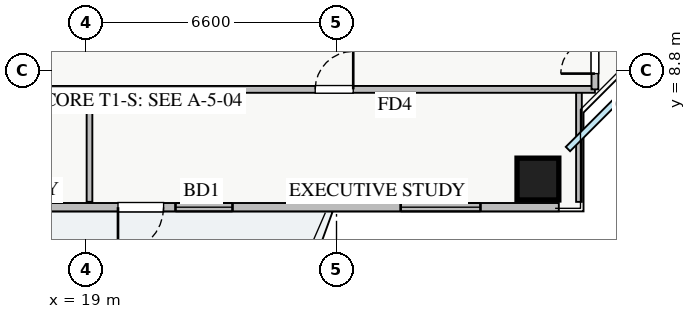
"""IFC4 building model, lengths in metres.
Left out: names, types, materials, properties, quantities, classifications, styles, units other than length and angle.
Written with IfcOpenShell. Run it as: python <this file> out.ifc"""

import sys

from ifc_helpers import new_model, si_unit, direction, frame, frame_2d, origin, origin_2d, place, context, subcontext, project, spatial, rectangle, extrude, source, transform, mapped, element, fill, save


model = new_model("IFC4")
c1 = context("Model", 3, precision=1e-05, world=origin(), true_north=direction((0.0, 1.0)))
c2 = subcontext(c1, "Body", "Model", "MODEL_VIEW")
j1 = project(units=[si_unit("LENGTHUNIT", "METRE"), si_unit("PLANEANGLEUNIT", "RADIAN")], contexts=[c1])
p1 = place(None, origin())
s1 = spatial("IfcSite", under=j1, at=p1, CompositionType="ELEMENT")
p2 = place(p1, origin())
s2 = spatial("IfcBuilding", under=s1, at=p2, CompositionType="ELEMENT")
p3 = place(p2, frame((0.0, 0.0, 103.5)))
s3 = spatial("IfcBuildingStorey", under=s2, at=p3, CompositionType="ELEMENT", Elevation=103.5)
m1 = source(origin(), c2, "Body", "SweptSolid", [
    extrude(rectangle(XDim=1.1, YDim=1.1, at=origin_2d()), origin(), (0.0, 0.0, 1.0), 3.25),
])
p4 = place(p3, frame((30.9, 5.95, 0.0), z_axis=(0.0, 0.0, 1.0), x_axis=(1.0, 0.0, 0.0)))
e1 = element("IfcColumn", 1, at=p4, inside=s3, PredefinedType="COLUMN", context=c2, shape_type="MappedRepresentation", body=[
    mapped(m1, transform((0.0, 0.0, 0.0), x_axis=(1.0, 0.0, 0.0), y_axis=(0.0, 1.0, 0.0), z_axis=(0.0, 0.0, 1.0), scale=1.0)),
])
p5 = place(p3, frame((6.55, 5.21, 0.0), z_axis=(0.0, 0.0, 1.0), x_axis=(1.0, 0.0, 0.0)))
e2 = element("IfcWall", 2, at=p5, inside=s3, PredefinedType="STANDARD", context=c2, shape_type="SweptSolid", body=[
    extrude(rectangle(XDim=24.9, YDim=0.22, at=frame_2d((12.45, 0.0))), origin(), (0.0, 0.0, 1.0), 2.61),
])
p6 = place(p5, frame((13.3, 0.0, 0.0)))
e3 = element("IfcOpeningElement", 3, at=p6, cuts=e2, PredefinedType="OPENING", context=c2, shape_type="SweptSolid", body=[
    extrude(rectangle(XDim=1.2, YDim=2.1, at=frame_2d((0.6, 1.05))), frame((0.0, 0.12, 0.0), z_axis=(0.0, -1.0, 0.0), x_axis=(1.0, 0.0, 0.0)), (0.0, 0.0, 1.0), 0.24),
])
p7 = place(p5, frame((0.393, 0.0, 0.9)))
e4 = element("IfcOpeningElement", 4, at=p7, cuts=e2, PredefinedType="OPENING", context=c2, shape_type="SweptSolid", body=[
    extrude(rectangle(XDim=1.5, YDim=1.5, at=frame_2d((0.75, 0.75))), frame((0.0, 0.12, 0.0), z_axis=(0.0, -1.0, 0.0), x_axis=(1.0, 0.0, 0.0)), (0.0, 0.0, 1.0), 0.24),
])
p8 = place(p5, frame((8.438, 0.0, 0.9)))
e5 = element("IfcOpeningElement", 5, at=p8, cuts=e2, PredefinedType="OPENING", context=c2, shape_type="SweptSolid", body=[
    extrude(rectangle(XDim=1.8, YDim=1.45, at=frame_2d((0.9, 0.725))), frame((0.0, 0.12, 0.0), z_axis=(0.0, -1.0, 0.0), x_axis=(1.0, 0.0, 0.0)), (0.0, 0.0, 1.0), 0.24),
])
p9 = place(p5, frame((14.813, 0.0, 0.9)))
e6 = element("IfcOpeningElement", 6, at=p9, cuts=e2, PredefinedType="OPENING", context=c2, shape_type="SweptSolid", body=[
    extrude(rectangle(XDim=1.5, YDim=1.45, at=frame_2d((0.75, 0.725))), frame((0.0, 0.12, 0.0), z_axis=(0.0, -1.0, 0.0), x_axis=(1.0, 0.0, 0.0)), (0.0, 0.0, 1.0), 0.24),
])
p10 = place(p5, frame((20.738, 0.0, 0.9)))
e7 = element("IfcOpeningElement", 7, at=p10, cuts=e2, PredefinedType="OPENING", context=c2, shape_type="SweptSolid", body=[
    extrude(rectangle(XDim=2.1, YDim=1.48, at=frame_2d((1.05, 0.74))), frame((0.0, 0.12, 0.0), z_axis=(0.0, -1.0, 0.0), x_axis=(1.0, 0.0, 0.0)), (0.0, 0.0, 1.0), 0.24),
])
p11 = place(p5, frame((4.171, 0.0, 0.9)))
e8 = element("IfcOpeningElement", 8, at=p11, cuts=e2, PredefinedType="OPENING", context=c2, shape_type="SweptSolid", body=[
    extrude(rectangle(XDim=2.4, YDim=1.5, at=frame_2d((1.2, 0.75))), frame((0.0, 0.12, 0.0), z_axis=(0.0, -1.0, 0.0), x_axis=(1.0, 0.0, 0.0)), (0.0, 0.0, 1.0), 0.24),
])
p12 = place(p3, frame((19.1, 5.35, 0.0), z_axis=(0.0, 0.0, 1.0), x_axis=(0.0, 1.0, 0.0)))
e9 = element("IfcWall", 9, at=p12, inside=s3, PredefinedType="PARTITIONING", context=c2, shape_type="SweptSolid", body=[
    extrude(rectangle(XDim=2.96, YDim=0.15, at=frame_2d((1.48, 0.0))), origin(), (0.0, 0.0, 1.0), 2.865),
])
p13 = place(p3, frame((31.98, 5.35, 0.0), z_axis=(0.0, 0.0, 1.0), x_axis=(0.0, 1.0, 0.0)))
e10 = element("IfcWall", 10, at=p13, inside=s3, PredefinedType="PARTITIONING", context=c2, shape_type="SweptSolid", body=[
    extrude(rectangle(XDim=2.96, YDim=0.15, at=frame_2d((1.48, 0.0))), origin(), (0.0, 0.0, 1.0), 3.07),
])
p14 = place(p3, frame((8.82, 8.31, 0.0), z_axis=(0.0, 0.0, 1.0), x_axis=(1.0, 0.0, 0.0)))
e11 = element("IfcWall", 11, at=p14, inside=s3, PredefinedType="PARTITIONING", context=c2, shape_type="SweptSolid", body=[
    extrude(rectangle(XDim=23.58, YDim=0.18, at=frame_2d((11.79, 0.0))), origin(), (0.0, 0.0, 1.0), 3.07),
])
p15 = place(p14, frame((4.64, 0.0, 0.0)))
e12 = element("IfcOpeningElement", 12, at=p15, cuts=e11, PredefinedType="OPENING", context=c2, shape_type="SweptSolid", body=[
    extrude(rectangle(XDim=1.0, YDim=2.05, at=frame_2d((0.5, 1.025))), frame((0.0, 0.1, 0.0), z_axis=(0.0, -1.0, 0.0), x_axis=(1.0, 0.0, 0.0)), (0.0, 0.0, 1.0), 0.2),
])
p16 = place(p14, frame((16.22, 0.0, 0.0)))
e13 = element("IfcOpeningElement", 13, at=p16, cuts=e11, PredefinedType="OPENING", context=c2, shape_type="SweptSolid", body=[
    extrude(rectangle(XDim=1.0, YDim=2.05, at=frame_2d((0.5, 1.025))), frame((0.0, 0.1, 0.0), z_axis=(0.0, -1.0, 0.0), x_axis=(1.0, 0.0, 0.0)), (0.0, 0.0, 1.0), 0.2),
])
p17 = place(p3, frame((32.4, 8.31, 0.0), z_axis=(0.0, 0.0, 1.0), x_axis=(0.0, 1.0, 0.0)))
e14 = element("IfcWall", 14, at=p17, inside=s3, PredefinedType="PARTITIONING", context=c2, shape_type="SweptSolid", body=[
    extrude(rectangle(XDim=29.13, YDim=0.18, at=frame_2d((14.565, 0.0))), origin(), (0.0, 0.0, 1.0), 3.07),
])
p18 = place(p17, frame((27.94, 0.0, 0.0)))
e15 = element("IfcOpeningElement", 15, at=p18, cuts=e14, PredefinedType="OPENING", context=c2, shape_type="SweptSolid", body=[
    extrude(rectangle(XDim=0.9, YDim=2.05, at=frame_2d((0.45, 1.025))), frame((0.0, 0.1, 0.0), z_axis=(0.0, -1.0, 0.0), x_axis=(1.0, 0.0, 0.0)), (0.0, 0.0, 1.0), 0.2),
])
p19 = place(p17, frame((0.415, 0.0, 0.0)))
e16 = element("IfcOpeningElement", 16, at=p19, cuts=e14, PredefinedType="OPENING", context=c2, shape_type="SweptSolid", body=[
    extrude(rectangle(XDim=0.9, YDim=2.05, at=frame_2d((0.45, 1.025))), frame((0.0, 0.1, 0.0), z_axis=(0.0, -1.0, 0.0), x_axis=(1.0, 0.0, 0.0)), (0.0, 0.0, 1.0), 0.2),
])
p20 = place(p17, frame((5.88, 0.0, 0.0)))
e17 = element("IfcOpeningElement", 17, at=p20, cuts=e14, PredefinedType="OPENING", context=c2, shape_type="SweptSolid", body=[
    extrude(rectangle(XDim=1.0, YDim=2.05, at=frame_2d((0.5, 1.025))), frame((0.0, 0.1, 0.0), z_axis=(0.0, -1.0, 0.0), x_axis=(1.0, 0.0, 0.0)), (0.0, 0.0, 1.0), 0.2),
])
p21 = place(p17, frame((12.23, 0.0, 0.0)))
e18 = element("IfcOpeningElement", 18, at=p21, cuts=e14, PredefinedType="OPENING", context=c2, shape_type="SweptSolid", body=[
    extrude(rectangle(XDim=1.0, YDim=2.05, at=frame_2d((0.5, 1.025))), frame((0.0, 0.1, 0.0), z_axis=(0.0, -1.0, 0.0), x_axis=(1.0, 0.0, 0.0)), (0.0, 0.0, 1.0), 0.2),
])
p22 = place(p17, frame((20.835, 0.0, 0.0)))
e19 = element("IfcOpeningElement", 19, at=p22, cuts=e14, PredefinedType="OPENING", context=c2, shape_type="SweptSolid", body=[
    extrude(rectangle(XDim=1.0, YDim=2.05, at=frame_2d((0.5, 1.025))), frame((0.0, 0.1, 0.0), z_axis=(0.0, -1.0, 0.0), x_axis=(1.0, 0.0, 0.0)), (0.0, 0.0, 1.0), 0.2),
])
m2 = source(origin(), c2, "Body", "SweptSolid", [
    extrude(rectangle(XDim=1.2, YDim=2.1, at=frame_2d((0.6, 1.05))), frame((0.0, 0.025, 0.0), z_axis=(0.0, -1.0, 0.0), x_axis=(1.0, 0.0, 0.0)), (0.0, 0.0, 1.0), 0.05),
])
p23 = place(p6, frame((1.2, 0.0, 0.0), z_axis=(0.0, 0.0, 1.0), x_axis=(-1.0, 0.0, 0.0)))
e20 = element("IfcDoor", 20, at=p23, inside=s3, OperationType="SINGLE_SWING_LEFT", PredefinedType="DOOR", context=c2, shape_type="MappedRepresentation", body=[
    mapped(m2, transform((0.0, 0.0, 0.0), x_axis=(1.0, 0.0, 0.0), y_axis=(0.0, 1.0, 0.0), z_axis=(0.0, 0.0, 1.0), scale=1.0)),
])
fill(e3, e20)
m3 = source(origin(), c2, "Body", "SweptSolid", [
    extrude(rectangle(XDim=1.5, YDim=1.45, at=frame_2d((0.75, 0.725))), frame((0.0, 0.03, 0.0), z_axis=(0.0, -1.0, 0.0), x_axis=(1.0, 0.0, 0.0)), (0.0, 0.0, 1.0), 0.06),
])
p24 = place(p9, origin())
e21 = element("IfcWindow", 21, at=p24, inside=s3, PartitioningType="DOUBLE_PANEL_VERTICAL", PredefinedType="WINDOW", context=c2, shape_type="MappedRepresentation", body=[
    mapped(m3, transform((0.0, 0.0, 0.0), x_axis=(1.0, 0.0, 0.0), y_axis=(0.0, 1.0, 0.0), z_axis=(0.0, 0.0, 1.0), scale=1.0)),
])
fill(e6, e21)
m4 = source(origin(), c2, "Body", "SweptSolid", [
    extrude(rectangle(XDim=2.1, YDim=1.48, at=frame_2d((1.05, 0.74))), frame((0.0, 0.03, 0.0), z_axis=(0.0, -1.0, 0.0), x_axis=(1.0, 0.0, 0.0)), (0.0, 0.0, 1.0), 0.06),
])
p25 = place(p10, origin())
e22 = element("IfcWindow", 22, at=p25, inside=s3, PartitioningType="TRIPLE_PANEL_VERTICAL", PredefinedType="WINDOW", context=c2, shape_type="MappedRepresentation", body=[
    mapped(m4, transform((0.0, 0.0, 0.0), x_axis=(1.0, 0.0, 0.0), y_axis=(0.0, 1.0, 0.0), z_axis=(0.0, 0.0, 1.0), scale=1.0)),
])
fill(e7, e22)
m5 = source(origin(), c2, "Body", "SweptSolid", [
    extrude(rectangle(XDim=1.0, YDim=2.05, at=frame_2d((0.5, 1.025))), frame((0.0, 0.025, 0.0), z_axis=(0.0, -1.0, 0.0), x_axis=(1.0, 0.0, 0.0)), (0.0, 0.0, 1.0), 0.05),
])
p26 = place(p16, origin())
e23 = element("IfcDoor", 23, at=p26, inside=s3, OperationType="SINGLE_SWING_RIGHT", PredefinedType="DOOR", context=c2, shape_type="MappedRepresentation", body=[
    mapped(m5, transform((0.0, 0.0, 0.0), x_axis=(1.0, 0.0, 0.0), y_axis=(0.0, 1.0, 0.0), z_axis=(0.0, 0.0, 1.0), scale=1.0)),
])
fill(e13, e23)
m6 = source(origin(), c2, "Body", "SweptSolid", [
    extrude(rectangle(XDim=0.9, YDim=2.05, at=frame_2d((0.45, 1.025))), frame((0.0, 0.025, 0.0), z_axis=(0.0, -1.0, 0.0), x_axis=(1.0, 0.0, 0.0)), (0.0, 0.0, 1.0), 0.05),
])
p27 = place(p19, origin())
e24 = element("IfcDoor", 24, at=p27, inside=s3, OperationType="SINGLE_SWING_LEFT", PredefinedType="DOOR", context=c2, shape_type="MappedRepresentation", body=[
    mapped(m6, transform((0.0, 0.0, 0.0), x_axis=(1.0, 0.0, 0.0), y_axis=(0.0, 1.0, 0.0), z_axis=(0.0, 0.0, 1.0), scale=1.0)),
])
fill(e16, e24)
save(model, sys.argv[1])
